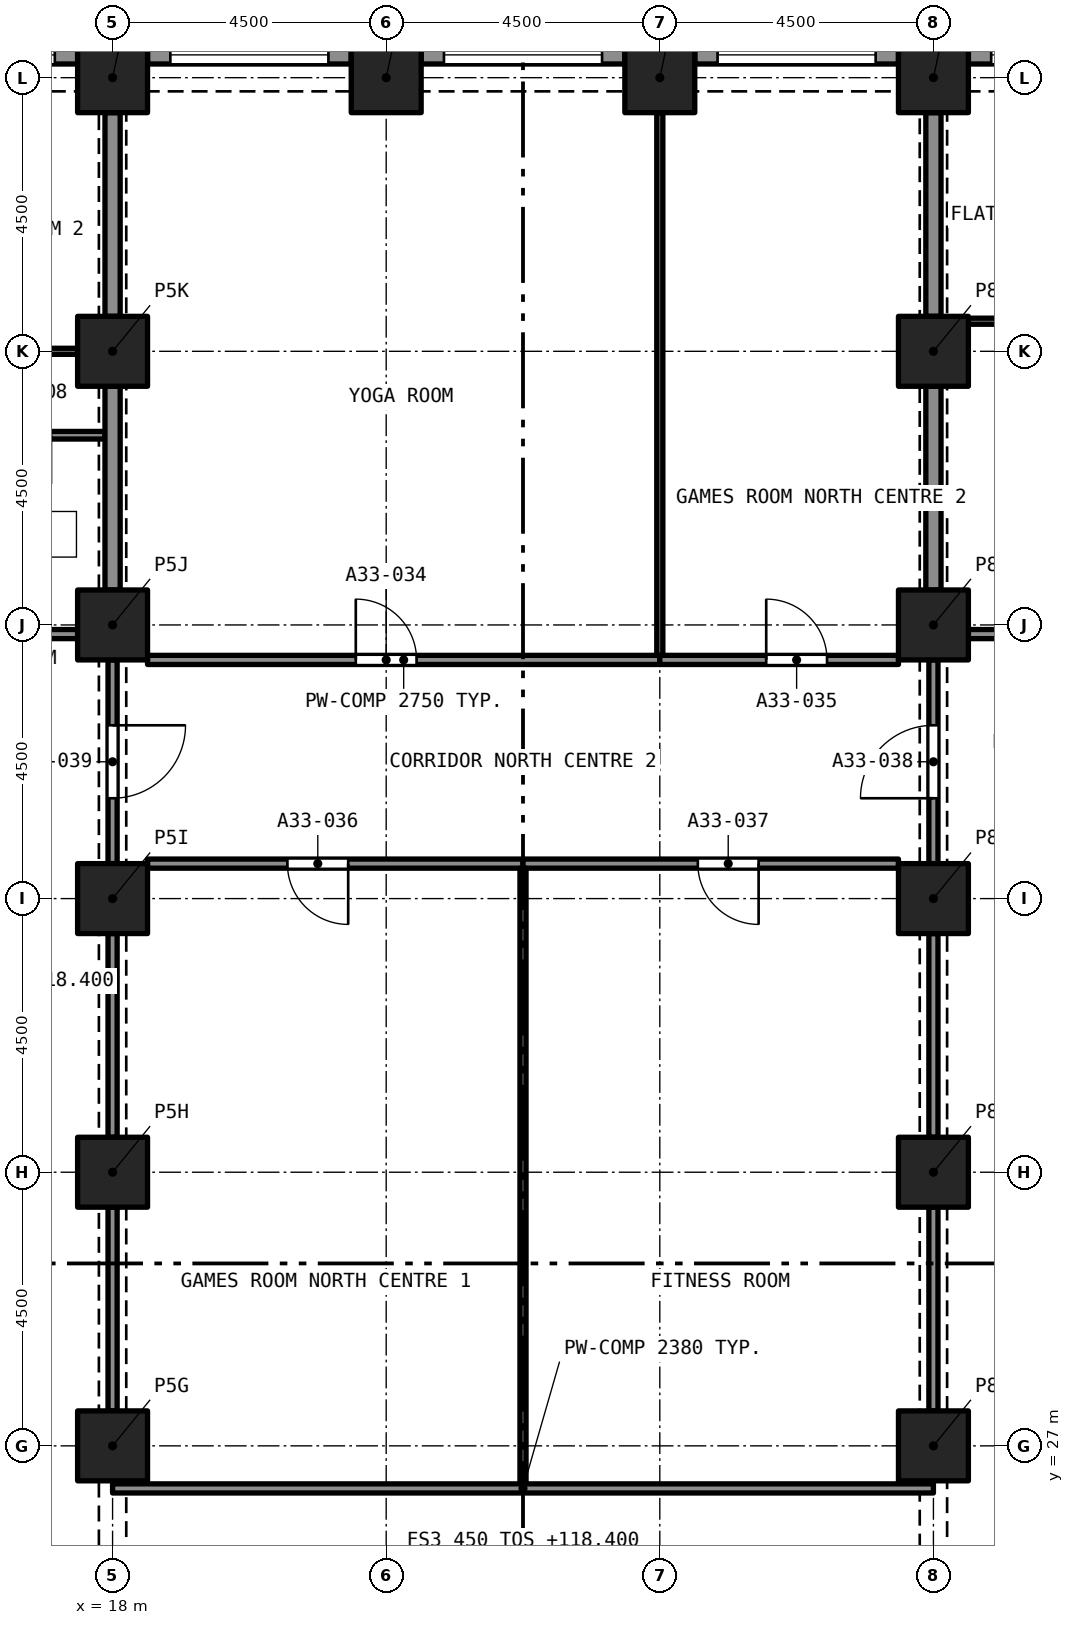
"""IFC4 building model, lengths in metres.
Left out: names, types, materials, properties, quantities, classifications, styles, units other than length and angle.
Written with IfcOpenShell. Run it as: python <this file> out.ifc"""

import sys

from ifc_helpers import new_model, si_unit, direction, frame, frame_2d, origin, origin_2d, place, context, subcontext, project, spatial, rectangle, extrude, element, fill, save


model = new_model("IFC4")
c1 = context("Model", 3, precision=1e-05, world=origin(), true_north=direction((0.0, 1.0)))
c2 = subcontext(c1, "Body", "Model", "MODEL_VIEW")
j1 = project(units=[si_unit("LENGTHUNIT", "METRE"), si_unit("PLANEANGLEUNIT", "RADIAN")], contexts=[c1])
p1 = place(None, origin())
s1 = spatial("IfcSite", under=j1, at=p1, CompositionType="ELEMENT")
p2 = place(p1, origin())
s2 = spatial("IfcBuilding", under=s1, at=p2, CompositionType="ELEMENT")
p3 = place(p2, frame((0.0, 0.0, 118.4)))
s3 = spatial("IfcBuildingStorey", under=s2, at=p3, CompositionType="ELEMENT", Elevation=118.4)
for number, where, z_axis, x_axis in (
    (1, (18.0, 27.0, 0.0), (0.0, 0.0, 1.0), (1.0, 0.0, 0.0)),
    (2, (31.5, 27.0, 0.0), (0.0, 0.0, 1.0), (1.0, 0.0, 0.0)),
    (3, (18.0, 31.5, 0.0), (0.0, 0.0, 1.0), (1.0, 0.0, 0.0)),
    (4, (31.5, 31.5, 0.0), (0.0, 0.0, 1.0), (1.0, 0.0, 0.0)),
    (5, (18.0, 36.0, 0.0), (0.0, 0.0, 1.0), (1.0, 0.0, 0.0)),
    (6, (31.5, 36.0, 0.0), (0.0, 0.0, 1.0), (1.0, 0.0, 0.0)),
    (7, (18.0, 40.5, 0.0), (0.0, 0.0, 1.0), (1.0, 0.0, 0.0)),
    (8, (31.5, 40.5, 0.0), (0.0, 0.0, 1.0), (1.0, 0.0, 0.0)),
    (9, (18.0, 45.0, 0.0), (0.0, 0.0, 1.0), (1.0, 0.0, 0.0)),
    (10, (31.5, 45.0, 0.0), (0.0, 0.0, 1.0), (1.0, 0.0, 0.0)),
    (11, (18.0, 49.5, 0.0), (0.0, 0.0, 1.0), (1.0, 0.0, 0.0)),
    (12, (22.5, 49.5, 0.0), (0.0, 0.0, 1.0), (1.0, 0.0, 0.0)),
    (13, (27.0, 49.5, 0.0), (0.0, 0.0, 1.0), (1.0, 0.0, 0.0)),
    (14, (31.5, 49.5, 0.0), (0.0, 0.0, 1.0), (1.0, 0.0, 0.0)),
):
    element("IfcColumn", number, at=place(p3, frame(where, z_axis=z_axis, x_axis=x_axis)), inside=s3, PredefinedType="COLUMN", context=c2, shape_type="SweptSolid", body=[
        extrude(rectangle(XDim=1.15, YDim=1.15, at=origin_2d()), origin(), (0.0, 0.0, 1.0), 3.2),
    ])
p4 = place(p3, frame((32.075, 49.875, 0.0), z_axis=(0.0, 0.0, 1.0), x_axis=(1.0, 0.0, 0.0)))
e15 = element("IfcWall", 15, at=p4, inside=s3, PredefinedType="SOLIDWALL", context=c2, shape_type="SweptSolid", body=[
    extrude(rectangle(XDim=3.35, YDim=0.3, at=frame_2d((1.675, 0.0))), origin(), (0.0, 0.0, 1.0), 3.2),
])
p5 = place(p4, frame((0.375, 0.0, 0.45)))
e16 = element("IfcOpeningElement", 16, at=p5, cuts=e15, PredefinedType="OPENING", context=c2, shape_type="SweptSolid", body=[
    extrude(rectangle(XDim=2.6, YDim=1.95, at=frame_2d((1.3, 0.975))), frame((0.0, 0.16, 0.0), z_axis=(0.0, -1.0, 0.0), x_axis=(1.0, 0.0, 0.0)), (0.0, 0.0, 1.0), 0.32),
])
p6 = place(p3, frame((27.575, 49.875, 0.0), z_axis=(0.0, 0.0, 1.0), x_axis=(1.0, 0.0, 0.0)))
e17 = element("IfcWall", 17, at=p6, inside=s3, PredefinedType="SOLIDWALL", context=c2, shape_type="SweptSolid", body=[
    extrude(rectangle(XDim=3.35, YDim=0.3, at=frame_2d((1.675, 0.0))), origin(), (0.0, 0.0, 1.0), 3.2),
])
p7 = place(p6, frame((0.375, 0.0, 0.45)))
e18 = element("IfcOpeningElement", 18, at=p7, cuts=e17, PredefinedType="OPENING", context=c2, shape_type="SweptSolid", body=[
    extrude(rectangle(XDim=2.6, YDim=1.95, at=frame_2d((1.3, 0.975))), frame((0.0, 0.16, 0.0), z_axis=(0.0, -1.0, 0.0), x_axis=(1.0, 0.0, 0.0)), (0.0, 0.0, 1.0), 0.32),
])
p8 = place(p3, frame((23.075, 49.875, 0.0), z_axis=(0.0, 0.0, 1.0), x_axis=(1.0, 0.0, 0.0)))
e19 = element("IfcWall", 19, at=p8, inside=s3, PredefinedType="SOLIDWALL", context=c2, shape_type="SweptSolid", body=[
    extrude(rectangle(XDim=3.35, YDim=0.3, at=frame_2d((1.675, 0.0))), origin(), (0.0, 0.0, 1.0), 3.2),
])
p9 = place(p8, frame((0.375, 0.0, 0.45)))
e20 = element("IfcOpeningElement", 20, at=p9, cuts=e19, PredefinedType="OPENING", context=c2, shape_type="SweptSolid", body=[
    extrude(rectangle(XDim=2.6, YDim=1.95, at=frame_2d((1.3, 0.975))), frame((0.0, 0.16, 0.0), z_axis=(0.0, -1.0, 0.0), x_axis=(1.0, 0.0, 0.0)), (0.0, 0.0, 1.0), 0.32),
])
p10 = place(p3, frame((18.575, 49.875, 0.0), z_axis=(0.0, 0.0, 1.0), x_axis=(1.0, 0.0, 0.0)))
e21 = element("IfcWall", 21, at=p10, inside=s3, PredefinedType="SOLIDWALL", context=c2, shape_type="SweptSolid", body=[
    extrude(rectangle(XDim=3.35, YDim=0.3, at=frame_2d((1.675, 0.0))), origin(), (0.0, 0.0, 1.0), 3.2),
])
p11 = place(p10, frame((0.375, 0.0, 0.45)))
e22 = element("IfcOpeningElement", 22, at=p11, cuts=e21, PredefinedType="OPENING", context=c2, shape_type="SweptSolid", body=[
    extrude(rectangle(XDim=2.6, YDim=1.95, at=frame_2d((1.3, 0.975))), frame((0.0, 0.16, 0.0), z_axis=(0.0, -1.0, 0.0), x_axis=(1.0, 0.0, 0.0)), (0.0, 0.0, 1.0), 0.32),
])
p12 = place(p3, frame((14.075, 49.875, 0.0), z_axis=(0.0, 0.0, 1.0), x_axis=(1.0, 0.0, 0.0)))
e23 = element("IfcWall", 23, at=p12, inside=s3, PredefinedType="SOLIDWALL", context=c2, shape_type="SweptSolid", body=[
    extrude(rectangle(XDim=3.35, YDim=0.3, at=frame_2d((1.675, 0.0))), origin(), (0.0, 0.0, 1.0), 3.2),
])
p13 = place(p12, frame((0.375, 0.0, 0.45)))
e24 = element("IfcOpeningElement", 24, at=p13, cuts=e23, PredefinedType="OPENING", context=c2, shape_type="SweptSolid", body=[
    extrude(rectangle(XDim=2.6, YDim=1.95, at=frame_2d((1.3, 0.975))), frame((0.0, 0.16, 0.0), z_axis=(0.0, -1.0, 0.0), x_axis=(1.0, 0.0, 0.0)), (0.0, 0.0, 1.0), 0.32),
])
p14 = place(p3, frame((17.875, 43.62, 0.0), z_axis=(0.0, 0.0, 1.0), x_axis=(-1.0, 0.0, 0.0)))
e25 = element("IfcWall", 25, at=p14, inside=s3, PredefinedType="PARTITIONING", context=c2, shape_type="SweptSolid", body=[
    extrude(rectangle(XDim=2.7, YDim=0.125, at=frame_2d((1.35, 0.0))), origin(), (0.0, 0.0, 1.0), 2.9),
])
p15 = place(p14, frame((0.888, 0.0, 0.0)))
e26 = element("IfcOpeningElement", 26, at=p15, cuts=e25, PredefinedType="OPENING", context=c2, shape_type="SweptSolid", body=[
    extrude(rectangle(XDim=0.8, YDim=2.1, at=frame_2d((0.4, 1.05))), frame((0.0, 0.073, 0.0), z_axis=(0.0, -1.0, 0.0), x_axis=(1.0, 0.0, 0.0)), (0.0, 0.0, 1.0), 0.145),
])
p16 = place(p3, frame((18.0, 41.075, 0.0), z_axis=(0.0, 0.0, 1.0), x_axis=(0.0, 1.0, 0.0)))
e27 = element("IfcWall", 27, at=p16, inside=s3, PredefinedType="PARTITIONING", context=c2, shape_type="SweptSolid", body=[
    extrude(rectangle(XDim=3.35, YDim=0.25, at=frame_2d((1.675, 0.0))), origin(), (0.0, 0.0, 1.0), 2.38),
])
p17 = place(p3, frame((13.5, 45.0, 0.0), z_axis=(0.0, 0.0, 1.0), x_axis=(1.0, 0.0, 0.0)))
e28 = element("IfcWall", 28, at=p17, inside=s3, PredefinedType="PARTITIONING", context=c2, shape_type="SweptSolid", body=[
    extrude(rectangle(XDim=3.925, YDim=0.1, at=frame_2d((1.962, 0.0))), origin(), (0.0, 0.0, 1.0), 2.9),
])
p18 = place(p17, frame((1.8, 0.0, 0.0)))
e29 = element("IfcOpeningElement", 29, at=p18, cuts=e28, PredefinedType="OPENING", context=c2, shape_type="SweptSolid", body=[
    extrude(rectangle(XDim=0.9, YDim=2.1, at=frame_2d((0.45, 1.05))), frame((0.0, 0.06, 0.0), z_axis=(0.0, -1.0, 0.0), x_axis=(1.0, 0.0, 0.0)), (0.0, 0.0, 1.0), 0.12),
])
p19 = place(p3, frame((18.0, 45.575, 0.0), z_axis=(0.0, 0.0, 1.0), x_axis=(0.0, 1.0, 0.0)))
e30 = element("IfcWall", 30, at=p19, inside=s3, PredefinedType="PARTITIONING", context=c2, shape_type="SweptSolid", body=[
    extrude(rectangle(XDim=3.35, YDim=0.25, at=frame_2d((1.675, 0.0))), origin(), (0.0, 0.0, 1.0), 2.38),
])
p20 = place(p3, frame((13.35, 40.35, 0.0), z_axis=(0.0, 0.0, 1.0), x_axis=(1.0, 0.0, 0.0)))
e31 = element("IfcWall", 31, at=p20, inside=s3, PredefinedType="PARTITIONING", context=c2, shape_type="SweptSolid", body=[
    extrude(rectangle(XDim=4.075, YDim=0.15, at=frame_2d((2.038, 0.0))), origin(), (0.0, 0.0, 1.0), 2.9),
])
p21 = place(p3, frame((32.075, 45.495, 0.0), z_axis=(0.0, 0.0, 1.0), x_axis=(1.0, 0.0, 0.0)))
e32 = element("IfcWall", 32, at=p21, inside=s3, PredefinedType="PARTITIONING", context=c2, shape_type="SweptSolid", body=[
    extrude(rectangle(XDim=3.925, YDim=0.1, at=frame_2d((1.962, 0.0))), origin(), (0.0, 0.0, 1.0), 2.9),
])
p22 = place(p21, frame((1.175, 0.0, 0.0)))
e33 = element("IfcOpeningElement", 33, at=p22, cuts=e32, PredefinedType="OPENING", context=c2, shape_type="SweptSolid", body=[
    extrude(rectangle(XDim=1.0, YDim=2.1, at=frame_2d((0.5, 1.05))), frame((0.0, 0.06, 0.0), z_axis=(0.0, -1.0, 0.0), x_axis=(1.0, 0.0, 0.0)), (0.0, 0.0, 1.0), 0.12),
])
p23 = place(p3, frame((31.5, 41.075, 0.0), z_axis=(0.0, 0.0, 1.0), x_axis=(0.0, 1.0, 0.0)))
e34 = element("IfcWall", 34, at=p23, inside=s3, PredefinedType="PARTITIONING", context=c2, shape_type="SweptSolid", body=[
    extrude(rectangle(XDim=3.35, YDim=0.25, at=frame_2d((1.675, 0.0))), origin(), (0.0, 0.0, 1.0), 2.38),
])
p24 = place(p3, frame((32.075, 40.35, 0.0), z_axis=(0.0, 0.0, 1.0), x_axis=(1.0, 0.0, 0.0)))
e35 = element("IfcWall", 35, at=p24, inside=s3, PredefinedType="PARTITIONING", context=c2, shape_type="SweptSolid", body=[
    extrude(rectangle(XDim=2.35, YDim=0.15, at=frame_2d((1.175, 0.0))), origin(), (0.0, 0.0, 1.0), 2.9),
])
p25 = place(p24, frame((1.175, 0.0, 0.0)))
e36 = element("IfcOpeningElement", 36, at=p25, cuts=e35, PredefinedType="OPENING", context=c2, shape_type="SweptSolid", body=[
    extrude(rectangle(XDim=1.0, YDim=2.1, at=frame_2d((0.5, 1.05))), frame((0.0, 0.085, 0.0), z_axis=(0.0, -1.0, 0.0), x_axis=(1.0, 0.0, 0.0)), (0.0, 0.0, 1.0), 0.17),
])
p26 = place(p3, frame((31.5, 45.575, 0.0), z_axis=(0.0, 0.0, 1.0), x_axis=(0.0, 1.0, 0.0)))
e37 = element("IfcWall", 37, at=p26, inside=s3, PredefinedType="PARTITIONING", context=c2, shape_type="SweptSolid", body=[
    extrude(rectangle(XDim=3.35, YDim=0.25, at=frame_2d((1.675, 0.0))), origin(), (0.0, 0.0, 1.0), 2.38),
])
p27 = place(p3, frame((18.575, 39.925, 0.0), z_axis=(0.0, 0.0, 1.0), x_axis=(1.0, 0.0, 0.0)))
e38 = element("IfcWall", 38, at=p27, inside=s3, PredefinedType="PARTITIONING", context=c2, shape_type="SweptSolid", body=[
    extrude(rectangle(XDim=8.425, YDim=0.15, at=frame_2d((4.212, 0.0))), origin(), (0.0, 0.0, 1.0), 2.75),
])
p28 = place(p27, frame((3.425, 0.0, 0.0)))
e39 = element("IfcOpeningElement", 39, at=p28, cuts=e38, PredefinedType="OPENING", context=c2, shape_type="SweptSolid", body=[
    extrude(rectangle(XDim=1.0, YDim=2.1, at=frame_2d((0.5, 1.05))), frame((0.0, 0.085, 0.0), z_axis=(0.0, -1.0, 0.0), x_axis=(1.0, 0.0, 0.0)), (0.0, 0.0, 1.0), 0.17),
])
p29 = place(p3, frame((27.0, 39.925, 0.0), z_axis=(0.0, 0.0, 1.0), x_axis=(1.0, 0.0, 0.0)))
e40 = element("IfcWall", 40, at=p29, inside=s3, PredefinedType="PARTITIONING", context=c2, shape_type="SweptSolid", body=[
    extrude(rectangle(XDim=3.925, YDim=0.15, at=frame_2d((1.962, 0.0))), origin(), (0.0, 0.0, 1.0), 2.75),
])
p30 = place(p29, frame((1.75, 0.0, 0.0)))
e41 = element("IfcOpeningElement", 41, at=p30, cuts=e40, PredefinedType="OPENING", context=c2, shape_type="SweptSolid", body=[
    extrude(rectangle(XDim=1.0, YDim=2.1, at=frame_2d((0.5, 1.05))), frame((0.0, 0.085, 0.0), z_axis=(0.0, -1.0, 0.0), x_axis=(1.0, 0.0, 0.0)), (0.0, 0.0, 1.0), 0.17),
])
p31 = place(p3, frame((24.75, 36.575, 0.0), z_axis=(0.0, 0.0, 1.0), x_axis=(-1.0, 0.0, 0.0)))
e42 = element("IfcWall", 42, at=p31, inside=s3, PredefinedType="PARTITIONING", context=c2, shape_type="SweptSolid", body=[
    extrude(rectangle(XDim=6.175, YDim=0.15, at=frame_2d((3.087, 0.0))), origin(), (0.0, 0.0, 1.0), 2.75),
])
p32 = place(p31, frame((2.875, 0.0, 0.0)))
e43 = element("IfcOpeningElement", 43, at=p32, cuts=e42, PredefinedType="OPENING", context=c2, shape_type="SweptSolid", body=[
    extrude(rectangle(XDim=1.0, YDim=2.1, at=frame_2d((0.5, 1.05))), frame((0.0, 0.085, 0.0), z_axis=(0.0, -1.0, 0.0), x_axis=(1.0, 0.0, 0.0)), (0.0, 0.0, 1.0), 0.17),
])
p33 = place(p3, frame((30.925, 36.575, 0.0), z_axis=(0.0, 0.0, 1.0), x_axis=(-1.0, 0.0, 0.0)))
e44 = element("IfcWall", 44, at=p33, inside=s3, PredefinedType="PARTITIONING", context=c2, shape_type="SweptSolid", body=[
    extrude(rectangle(XDim=6.175, YDim=0.15, at=frame_2d((3.087, 0.0))), origin(), (0.0, 0.0, 1.0), 2.75),
])
p34 = place(p33, frame((2.3, 0.0, 0.0)))
e45 = element("IfcOpeningElement", 45, at=p34, cuts=e44, PredefinedType="OPENING", context=c2, shape_type="SweptSolid", body=[
    extrude(rectangle(XDim=1.0, YDim=2.1, at=frame_2d((0.5, 1.05))), frame((0.0, 0.085, 0.0), z_axis=(0.0, -1.0, 0.0), x_axis=(1.0, 0.0, 0.0)), (0.0, 0.0, 1.0), 0.17),
])
p35 = place(p3, frame((31.5, 36.575, 0.0), z_axis=(0.0, 0.0, 1.0), x_axis=(0.0, 1.0, 0.0)))
e46 = element("IfcWall", 46, at=p35, inside=s3, PredefinedType="PARTITIONING", context=c2, shape_type="SweptSolid", body=[
    extrude(rectangle(XDim=3.35, YDim=0.15, at=frame_2d((1.675, 0.0))), origin(), (0.0, 0.0, 1.0), 2.38),
])
p36 = place(p35, frame((1.075, 0.0, 0.0)))
e47 = element("IfcOpeningElement", 47, at=p36, cuts=e46, PredefinedType="OPENING", context=c2, shape_type="SweptSolid", body=[
    extrude(rectangle(XDim=1.2, YDim=2.1, at=frame_2d((0.6, 1.05))), frame((0.0, 0.085, 0.0), z_axis=(0.0, -1.0, 0.0), x_axis=(1.0, 0.0, 0.0)), (0.0, 0.0, 1.0), 0.17),
])
p37 = place(p3, frame((18.0, 39.925, 0.0), z_axis=(0.0, 0.0, 1.0), x_axis=(0.0, -1.0, 0.0)))
e48 = element("IfcWall", 48, at=p37, inside=s3, PredefinedType="PARTITIONING", context=c2, shape_type="SweptSolid", body=[
    extrude(rectangle(XDim=3.35, YDim=0.15, at=frame_2d((1.675, 0.0))), origin(), (0.0, 0.0, 1.0), 2.38),
])
p38 = place(p37, frame((1.075, 0.0, 0.0)))
e49 = element("IfcOpeningElement", 49, at=p38, cuts=e48, PredefinedType="OPENING", context=c2, shape_type="SweptSolid", body=[
    extrude(rectangle(XDim=1.2, YDim=2.1, at=frame_2d((0.6, 1.05))), frame((0.0, 0.085, 0.0), z_axis=(0.0, -1.0, 0.0), x_axis=(1.0, 0.0, 0.0)), (0.0, 0.0, 1.0), 0.17),
])
p39 = place(p3, frame((27.0, 40.0, 0.0), z_axis=(0.0, 0.0, 1.0), x_axis=(0.0, 1.0, 0.0)))
e50 = element("IfcWall", 50, at=p39, inside=s3, PredefinedType="PARTITIONING", context=c2, shape_type="SweptSolid", body=[
    extrude(rectangle(XDim=8.925, YDim=0.1, at=frame_2d((4.462, 0.0))), origin(), (0.0, 0.0, 1.0), 2.75),
])
p40 = place(p3, frame((24.75, 26.375, 0.0), z_axis=(0.0, 0.0, 1.0), x_axis=(0.0, 1.0, 0.0)))
e51 = element("IfcWall", 51, at=p40, inside=s3, PredefinedType="PARTITIONING", context=c2, shape_type="SweptSolid", body=[
    extrude(rectangle(XDim=10.125, YDim=0.1, at=frame_2d((5.062, 0.0))), origin(), (0.0, 0.0, 1.0), 2.75),
])
for number, where, z_axis, x_axis in (
    (52, (18.0, 27.575, 0.0), (0.0, 0.0, 1.0), (0.0, 1.0, 0.0)),
    (53, (18.0, 32.075, 0.0), (0.0, 0.0, 1.0), (0.0, 1.0, 0.0)),
):
    element("IfcWall", number, at=place(p3, frame(where, z_axis=z_axis, x_axis=x_axis)), inside=s3, PredefinedType="PARTITIONING", context=c2, shape_type="SweptSolid", body=[
        extrude(rectangle(XDim=3.35, YDim=0.15, at=frame_2d((1.675, 0.0))), origin(), (0.0, 0.0, 1.0), 2.38),
    ])
p41 = place(p3, frame((18.0, 26.3, 0.0), z_axis=(0.0, 0.0, 1.0), x_axis=(1.0, 0.0, 0.0)))
e54 = element("IfcWall", 54, at=p41, inside=s3, PredefinedType="PARTITIONING", context=c2, shape_type="SweptSolid", body=[
    extrude(rectangle(XDim=13.5, YDim=0.15, at=frame_2d((6.75, 0.0))), origin(), (0.0, 0.0, 1.0), 2.38),
])
for number, where, z_axis, x_axis in (
    (55, (31.5, 32.075, 0.0), (0.0, 0.0, 1.0), (0.0, 1.0, 0.0)),
    (56, (31.5, 27.575, 0.0), (0.0, 0.0, 1.0), (0.0, 1.0, 0.0)),
):
    element("IfcWall", number, at=place(p3, frame(where, z_axis=z_axis, x_axis=x_axis)), inside=s3, PredefinedType="PARTITIONING", context=c2, shape_type="SweptSolid", body=[
        extrude(rectangle(XDim=3.35, YDim=0.15, at=frame_2d((1.675, 0.0))), origin(), (0.0, 0.0, 1.0), 2.38),
    ])
p42 = place(p5, origin())
e57 = element("IfcWindow", 57, at=p42, inside=s3, PartitioningType="SINGLE_PANEL", PredefinedType="WINDOW", context=c2, shape_type="SweptSolid", body=[
    extrude(rectangle(XDim=2.6, YDim=1.95, at=frame_2d((1.3, 0.975))), frame((0.0, 0.03, 0.0), z_axis=(0.0, -1.0, 0.0), x_axis=(1.0, 0.0, 0.0)), (0.0, 0.0, 1.0), 0.06),
])
fill(e16, e57)
p43 = place(p7, origin())
e58 = element("IfcWindow", 58, at=p43, inside=s3, PartitioningType="SINGLE_PANEL", PredefinedType="WINDOW", context=c2, shape_type="SweptSolid", body=[
    extrude(rectangle(XDim=2.6, YDim=1.95, at=frame_2d((1.3, 0.975))), frame((0.0, 0.03, 0.0), z_axis=(0.0, -1.0, 0.0), x_axis=(1.0, 0.0, 0.0)), (0.0, 0.0, 1.0), 0.06),
])
fill(e18, e58)
p44 = place(p9, origin())
e59 = element("IfcWindow", 59, at=p44, inside=s3, PartitioningType="SINGLE_PANEL", PredefinedType="WINDOW", context=c2, shape_type="SweptSolid", body=[
    extrude(rectangle(XDim=2.6, YDim=1.95, at=frame_2d((1.3, 0.975))), frame((0.0, 0.03, 0.0), z_axis=(0.0, -1.0, 0.0), x_axis=(1.0, 0.0, 0.0)), (0.0, 0.0, 1.0), 0.06),
])
fill(e20, e59)
p45 = place(p11, origin())
e60 = element("IfcWindow", 60, at=p45, inside=s3, PartitioningType="SINGLE_PANEL", PredefinedType="WINDOW", context=c2, shape_type="SweptSolid", body=[
    extrude(rectangle(XDim=2.6, YDim=1.95, at=frame_2d((1.3, 0.975))), frame((0.0, 0.03, 0.0), z_axis=(0.0, -1.0, 0.0), x_axis=(1.0, 0.0, 0.0)), (0.0, 0.0, 1.0), 0.06),
])
fill(e22, e60)
p46 = place(p13, origin())
e61 = element("IfcWindow", 61, at=p46, inside=s3, PartitioningType="SINGLE_PANEL", PredefinedType="WINDOW", context=c2, shape_type="SweptSolid", body=[
    extrude(rectangle(XDim=2.6, YDim=1.95, at=frame_2d((1.3, 0.975))), frame((0.0, 0.03, 0.0), z_axis=(0.0, -1.0, 0.0), x_axis=(1.0, 0.0, 0.0)), (0.0, 0.0, 1.0), 0.06),
])
fill(e24, e61)
p47 = place(p28, origin())
e62 = element("IfcDoor", 62, at=p47, inside=s3, OperationType="SINGLE_SWING_LEFT", PredefinedType="DOOR", context=c2, shape_type="SweptSolid", body=[
    extrude(rectangle(XDim=1.0, YDim=2.1, at=frame_2d((0.5, 1.05))), frame((0.0, 0.025, 0.0), z_axis=(0.0, -1.0, 0.0), x_axis=(1.0, 0.0, 0.0)), (0.0, 0.0, 1.0), 0.05),
])
fill(e39, e62)
p48 = place(p30, origin())
e63 = element("IfcDoor", 63, at=p48, inside=s3, OperationType="SINGLE_SWING_RIGHT", PredefinedType="DOOR", context=c2, shape_type="SweptSolid", body=[
    extrude(rectangle(XDim=1.0, YDim=2.1, at=frame_2d((0.5, 1.05))), frame((0.0, 0.025, 0.0), z_axis=(0.0, -1.0, 0.0), x_axis=(1.0, 0.0, 0.0)), (0.0, 0.0, 1.0), 0.05),
])
fill(e41, e63)
p49 = place(p32, origin())
e64 = element("IfcDoor", 64, at=p49, inside=s3, OperationType="SINGLE_SWING_RIGHT", PredefinedType="DOOR", context=c2, shape_type="SweptSolid", body=[
    extrude(rectangle(XDim=1.0, YDim=2.1, at=frame_2d((0.5, 1.05))), frame((0.0, 0.025, 0.0), z_axis=(0.0, -1.0, 0.0), x_axis=(1.0, 0.0, 0.0)), (0.0, 0.0, 1.0), 0.05),
])
fill(e43, e64)
p50 = place(p34, origin())
e65 = element("IfcDoor", 65, at=p50, inside=s3, OperationType="SINGLE_SWING_LEFT", PredefinedType="DOOR", context=c2, shape_type="SweptSolid", body=[
    extrude(rectangle(XDim=1.0, YDim=2.1, at=frame_2d((0.5, 1.05))), frame((0.0, 0.025, 0.0), z_axis=(0.0, -1.0, 0.0), x_axis=(1.0, 0.0, 0.0)), (0.0, 0.0, 1.0), 0.05),
])
fill(e45, e65)
p51 = place(p36, origin())
e66 = element("IfcDoor", 66, at=p51, inside=s3, OperationType="SINGLE_SWING_LEFT", PredefinedType="DOOR", context=c2, shape_type="SweptSolid", body=[
    extrude(rectangle(XDim=1.2, YDim=2.1, at=frame_2d((0.6, 1.05))), frame((0.0, 0.025, 0.0), z_axis=(0.0, -1.0, 0.0), x_axis=(1.0, 0.0, 0.0)), (0.0, 0.0, 1.0), 0.05),
])
fill(e47, e66)
p52 = place(p38, origin())
e67 = element("IfcDoor", 67, at=p52, inside=s3, OperationType="SINGLE_SWING_LEFT", PredefinedType="DOOR", context=c2, shape_type="SweptSolid", body=[
    extrude(rectangle(XDim=1.2, YDim=2.1, at=frame_2d((0.6, 1.05))), frame((0.0, 0.025, 0.0), z_axis=(0.0, -1.0, 0.0), x_axis=(1.0, 0.0, 0.0)), (0.0, 0.0, 1.0), 0.05),
])
fill(e49, e67)
save(model, sys.argv[1])
